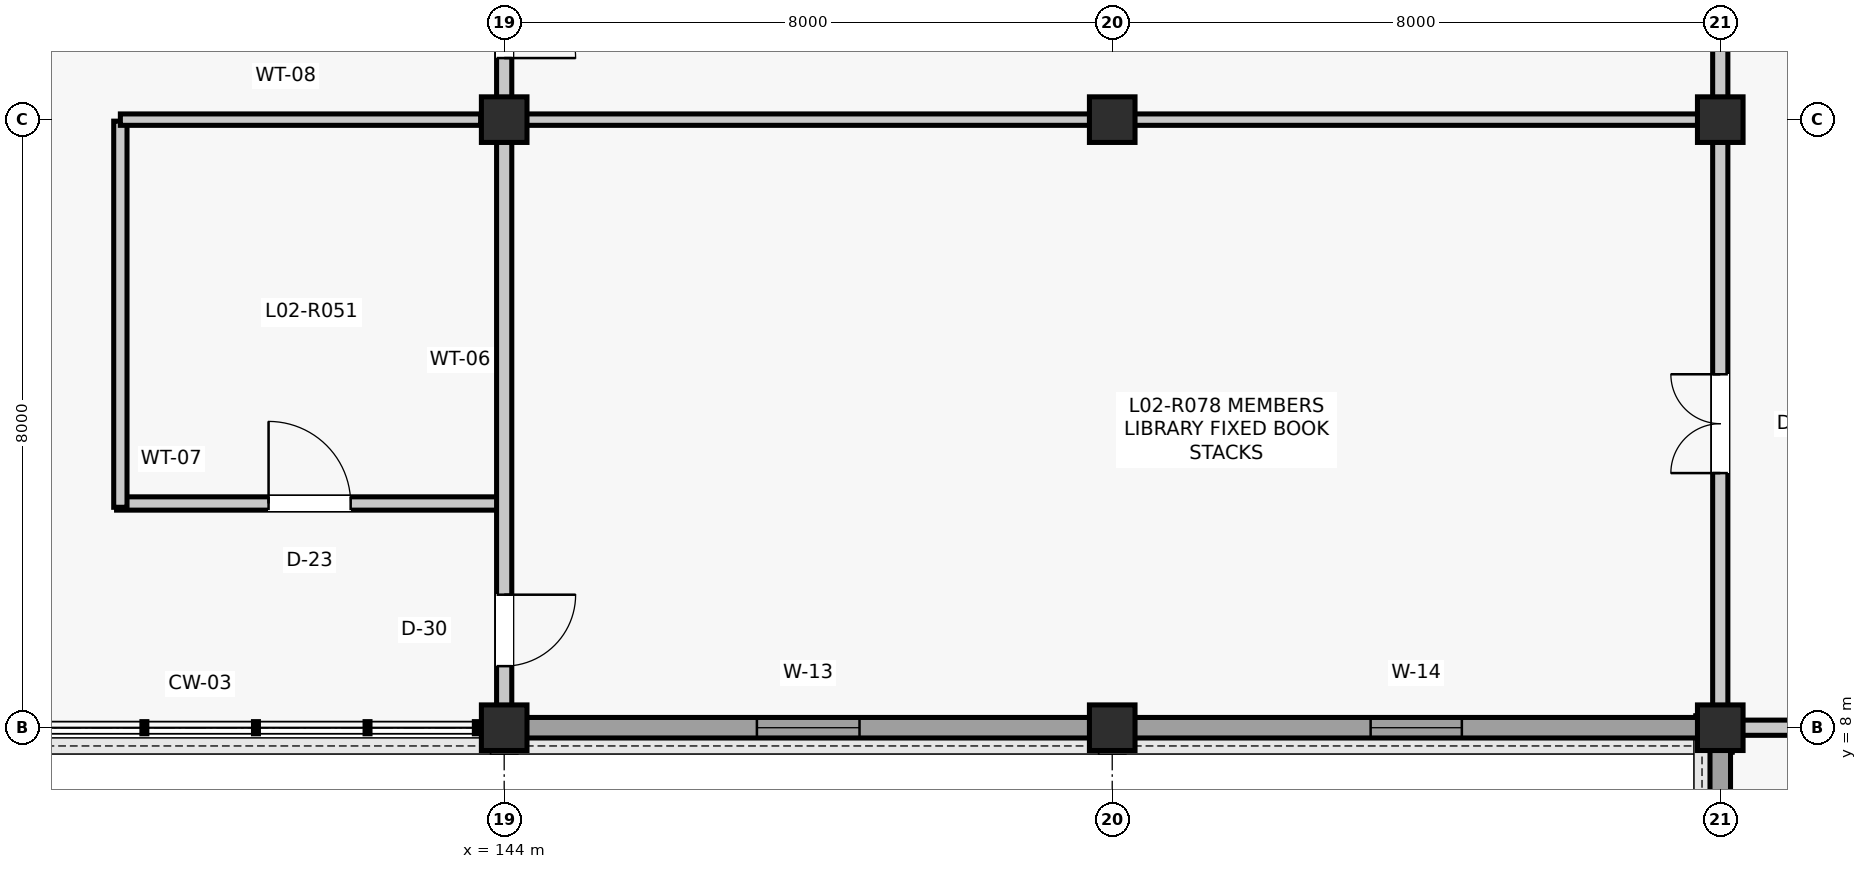
"""IFC4 building model, lengths in metres.
Left out: names, types, materials, properties, quantities, classifications, styles, units other than length and angle.
Written with IfcOpenShell. Run it as: python <this file> out.ifc"""

import sys

from ifc_helpers import new_model, si_unit, direction, frame, frame_2d, origin, origin_2d, place, context, subcontext, project, spatial, rectangle, extrude, element, fill, save


model = new_model("IFC4")
c1 = context("Model", 3, precision=1e-05, world=origin(), true_north=direction((0.0, 1.0)))
c2 = subcontext(c1, "Body", "Model", "MODEL_VIEW")
j1 = project(units=[si_unit("LENGTHUNIT", "METRE"), si_unit("PLANEANGLEUNIT", "RADIAN")], contexts=[c1])
p1 = place(None, origin())
s1 = spatial("IfcSite", under=j1, at=p1, CompositionType="ELEMENT")
p2 = place(p1, origin())
s2 = spatial("IfcBuilding", under=s1, at=p2, CompositionType="ELEMENT")
p3 = place(p2, frame((0.0, 0.0, 9.9)))
s3 = spatial("IfcBuildingStorey", under=s2, at=p3, CompositionType="ELEMENT", Elevation=9.9)
for number, where, z_axis, x_axis in (
    (1, (144.0, 8.0, 0.0), (0.0, 0.0, 1.0), (1.0, 0.0, 0.0)),
    (2, (144.0, 16.0, 0.0), (0.0, 0.0, 1.0), (1.0, 0.0, 0.0)),
    (3, (152.0, 8.0, 0.0), (0.0, 0.0, 1.0), (1.0, 0.0, 0.0)),
    (4, (152.0, 16.0, 0.0), (0.0, 0.0, 1.0), (1.0, 0.0, 0.0)),
    (5, (160.0, 8.0, 0.0), (0.0, 0.0, 1.0), (1.0, 0.0, 0.0)),
    (6, (160.0, 16.0, 0.0), (0.0, 0.0, 1.0), (1.0, 0.0, 0.0)),
):
    element("IfcColumn", number, at=place(p3, frame(where, z_axis=z_axis, x_axis=x_axis)), inside=s3, PredefinedType="COLUMN", context=c2, shape_type="SweptSolid", body=[
        extrude(rectangle(XDim=0.6, YDim=0.6, at=origin_2d()), origin(), (0.0, 0.0, 1.0), 3.96),
    ])
p4 = place(p3, frame((144.285, 8.0, 0.0), z_axis=(0.0, 0.0, 1.0), x_axis=(1.0, 0.0, 0.0)))
e7 = element("IfcWall", 7, at=p4, inside=s3, PredefinedType="SOLIDWALL", context=c2, shape_type="SweptSolid", body=[
    extrude(rectangle(XDim=7.43, YDim=0.27, at=frame_2d((3.715, 0.0))), origin(), (0.0, 0.0, 1.0), 3.344),
])
p5 = place(p4, frame((3.04, 0.0, 0.9)))
e8 = element("IfcOpeningElement", 8, at=p5, cuts=e7, PredefinedType="OPENING", context=c2, shape_type="SweptSolid", body=[
    extrude(rectangle(XDim=1.35, YDim=1.9, at=frame_2d((0.675, 0.95))), frame((0.0, 0.145, 0.0), z_axis=(0.0, -1.0, 0.0), x_axis=(1.0, 0.0, 0.0)), (0.0, 0.0, 1.0), 0.29),
])
p6 = place(p3, frame((152.285, 8.0, 0.0), z_axis=(0.0, 0.0, 1.0), x_axis=(1.0, 0.0, 0.0)))
e9 = element("IfcWall", 9, at=p6, inside=s3, PredefinedType="SOLIDWALL", context=c2, shape_type="SweptSolid", body=[
    extrude(rectangle(XDim=7.43, YDim=0.27, at=frame_2d((3.715, 0.0))), origin(), (0.0, 0.0, 1.0), 3.284),
])
p7 = place(p6, frame((3.115, 0.0, 0.9)))
e10 = element("IfcOpeningElement", 10, at=p7, cuts=e9, PredefinedType="OPENING", context=c2, shape_type="SweptSolid", body=[
    extrude(rectangle(XDim=1.2, YDim=1.8, at=frame_2d((0.6, 0.9))), frame((0.0, 0.145, 0.0), z_axis=(0.0, -1.0, 0.0), x_axis=(1.0, 0.0, 0.0)), (0.0, 0.0, 1.0), 0.29),
])
p8 = place(p3, frame((160.0, 0.285, 0.0), z_axis=(0.0, 0.0, 1.0), x_axis=(0.0, 1.0, 0.0)))
e11 = element("IfcWall", 11, at=p8, inside=s3, PredefinedType="SOLIDWALL", context=c2, shape_type="SweptSolid", body=[
    extrude(rectangle(XDim=7.43, YDim=0.27, at=frame_2d((3.715, 0.0))), origin(), (0.0, 0.0, 1.0), 3.284),
])
p9 = place(p8, frame((3.115, 0.0, 0.9)))
e12 = element("IfcOpeningElement", 12, at=p9, cuts=e11, PredefinedType="OPENING", context=c2, shape_type="SweptSolid", body=[
    extrude(rectangle(XDim=1.2, YDim=1.8, at=frame_2d((0.6, 0.9))), frame((0.0, 0.145, 0.0), z_axis=(0.0, -1.0, 0.0), x_axis=(1.0, 0.0, 0.0)), (0.0, 0.0, 1.0), 0.29),
])
p10 = place(p3, frame((138.9, 10.95, 0.0), z_axis=(0.0, 0.0, 1.0), x_axis=(1.0, 0.0, 0.0)))
e13 = element("IfcWall", 13, at=p10, inside=s3, PredefinedType="PARTITIONING", context=c2, shape_type="SweptSolid", body=[
    extrude(rectangle(XDim=5.08, YDim=0.175, at=frame_2d((2.54, 0.0))), origin(), (0.0, 0.0, 1.0), 3.221),
])
p11 = place(p10, frame((2.0, 0.0, 0.0)))
e14 = element("IfcOpeningElement", 14, at=p11, cuts=e13, PredefinedType="OPENING", context=c2, shape_type="SweptSolid", body=[
    extrude(rectangle(XDim=1.08, YDim=2.2, at=frame_2d((0.54, 1.1))), frame((0.0, 0.097, 0.0), z_axis=(0.0, -1.0, 0.0), x_axis=(1.0, 0.0, 0.0)), (0.0, 0.0, 1.0), 0.195),
])
p12 = place(p3, frame((138.95, 10.9, 0.0), z_axis=(0.0, 0.0, 1.0), x_axis=(0.0, 1.0, 0.0)))
e15 = element("IfcWall", 15, at=p12, inside=s3, PredefinedType="PARTITIONING", context=c2, shape_type="SweptSolid", body=[
    extrude(rectangle(XDim=5.08, YDim=0.175, at=frame_2d((2.54, 0.0))), origin(), (0.0, 0.0, 1.0), 3.151),
])
p13 = place(p3, frame((138.95, 16.0, 0.0), z_axis=(0.0, 0.0, 1.0), x_axis=(1.0, 0.0, 0.0)))
e16 = element("IfcWall", 16, at=p13, inside=s3, PredefinedType="PARTITIONING", context=c2, shape_type="SweptSolid", body=[
    extrude(rectangle(XDim=4.74, YDim=0.15, at=frame_2d((2.37, 0.0))), origin(), (0.0, 0.0, 1.0), 3.151),
])
p14 = place(p3, frame((144.0, 8.29, 0.0), z_axis=(0.0, 0.0, 1.0), x_axis=(0.0, 1.0, 0.0)))
e17 = element("IfcWall", 17, at=p14, inside=s3, PredefinedType="PARTITIONING", context=c2, shape_type="SweptSolid", body=[
    extrude(rectangle(XDim=7.42, YDim=0.2, at=frame_2d((3.71, 0.0))), origin(), (0.0, 0.0, 1.0), 3.221),
])
p15 = place(p14, frame((0.52, 0.0, 0.0)))
e18 = element("IfcOpeningElement", 18, at=p15, cuts=e17, PredefinedType="OPENING", context=c2, shape_type="SweptSolid", body=[
    extrude(rectangle(XDim=0.94, YDim=2.12, at=frame_2d((0.47, 1.06))), frame((0.0, 0.11, 0.0), z_axis=(0.0, -1.0, 0.0), x_axis=(1.0, 0.0, 0.0)), (0.0, 0.0, 1.0), 0.22),
])
p16 = place(p3, frame((144.0, 16.29, 0.0), z_axis=(0.0, 0.0, 1.0), x_axis=(0.0, 1.0, 0.0)))
e19 = element("IfcWall", 19, at=p16, inside=s3, PredefinedType="PARTITIONING", context=c2, shape_type="SweptSolid", body=[
    extrude(rectangle(XDim=7.42, YDim=0.2, at=frame_2d((3.71, 0.0))), origin(), (0.0, 0.0, 1.0), 3.157),
])
p17 = place(p16, frame((0.52, 0.0, 0.0)))
e20 = element("IfcOpeningElement", 20, at=p17, cuts=e19, PredefinedType="OPENING", context=c2, shape_type="SweptSolid", body=[
    extrude(rectangle(XDim=0.94, YDim=2.12, at=frame_2d((0.47, 1.06))), frame((0.0, 0.11, 0.0), z_axis=(0.0, -1.0, 0.0), x_axis=(1.0, 0.0, 0.0)), (0.0, 0.0, 1.0), 0.22),
])
p18 = place(p3, frame((144.29, 16.0, 0.0), z_axis=(0.0, 0.0, 1.0), x_axis=(1.0, 0.0, 0.0)))
e21 = element("IfcWall", 21, at=p18, inside=s3, PredefinedType="PARTITIONING", context=c2, shape_type="SweptSolid", body=[
    extrude(rectangle(XDim=7.42, YDim=0.15, at=frame_2d((3.71, 0.0))), origin(), (0.0, 0.0, 1.0), 3.082),
])
p19 = place(p3, frame((160.0, 8.29, 0.0), z_axis=(0.0, 0.0, 1.0), x_axis=(0.0, 1.0, 0.0)))
e22 = element("IfcWall", 22, at=p19, inside=s3, PredefinedType="PARTITIONING", context=c2, shape_type="SweptSolid", body=[
    extrude(rectangle(XDim=7.42, YDim=0.2, at=frame_2d((3.71, 0.0))), origin(), (0.0, 0.0, 1.0), 3.227),
])
p20 = place(p19, frame((3.06, 0.0, 0.0)))
e23 = element("IfcOpeningElement", 23, at=p20, cuts=e22, PredefinedType="OPENING", context=c2, shape_type="SweptSolid", body=[
    extrude(rectangle(XDim=1.3, YDim=2.2, at=frame_2d((0.65, 1.1))), frame((0.0, 0.11, 0.0), z_axis=(0.0, -1.0, 0.0), x_axis=(1.0, 0.0, 0.0)), (0.0, 0.0, 1.0), 0.22),
])
p21 = place(p3, frame((152.29, 16.0, 0.0), z_axis=(0.0, 0.0, 1.0), x_axis=(1.0, 0.0, 0.0)))
e24 = element("IfcWall", 24, at=p21, inside=s3, PredefinedType="PARTITIONING", context=c2, shape_type="SweptSolid", body=[
    extrude(rectangle(XDim=7.42, YDim=0.15, at=frame_2d((3.71, 0.0))), origin(), (0.0, 0.0, 1.0), 3.157),
])
p22 = place(p3, frame((160.0, 16.29, 0.0), z_axis=(0.0, 0.0, 1.0), x_axis=(0.0, 1.0, 0.0)))
e25 = element("IfcWall", 25, at=p22, inside=s3, PredefinedType="PARTITIONING", context=c2, shape_type="SweptSolid", body=[
    extrude(rectangle(XDim=7.42, YDim=0.2, at=frame_2d((3.71, 0.0))), origin(), (0.0, 0.0, 1.0), 3.151),
])
p23 = place(p22, frame((3.01, 0.0, 0.0)))
e26 = element("IfcOpeningElement", 26, at=p23, cuts=e25, PredefinedType="OPENING", context=c2, shape_type="SweptSolid", body=[
    extrude(rectangle(XDim=1.4, YDim=2.2, at=frame_2d((0.7, 1.1))), frame((0.0, 0.11, 0.0), z_axis=(0.0, -1.0, 0.0), x_axis=(1.0, 0.0, 0.0)), (0.0, 0.0, 1.0), 0.22),
])
p24 = place(p3, frame((160.29, 8.0, 0.0), z_axis=(0.0, 0.0, 1.0), x_axis=(1.0, 0.0, 0.0)))
e27 = element("IfcWall", 27, at=p24, inside=s3, PredefinedType="PARTITIONING", context=c2, shape_type="SweptSolid", body=[
    extrude(rectangle(XDim=7.42, YDim=0.2, at=frame_2d((3.71, 0.0))), origin(), (0.0, 0.0, 1.0), 3.157),
])
p25 = place(p24, frame((3.25, 0.0, 0.0)))
e28 = element("IfcOpeningElement", 28, at=p25, cuts=e27, PredefinedType="OPENING", context=c2, shape_type="SweptSolid", body=[
    extrude(rectangle(XDim=0.92, YDim=2.1, at=frame_2d((0.46, 1.05))), frame((0.0, 0.11, 0.0), z_axis=(0.0, -1.0, 0.0), x_axis=(1.0, 0.0, 0.0)), (0.0, 0.0, 1.0), 0.22),
])
p26 = place(p5, origin())
e29 = element("IfcWindow", 29, at=p26, inside=s3, PartitioningType="SINGLE_PANEL", PredefinedType="WINDOW", context=c2, shape_type="SweptSolid", body=[
    extrude(rectangle(XDim=1.35, YDim=1.9, at=frame_2d((0.675, 0.95))), frame((0.0, 0.03, 0.0), z_axis=(0.0, -1.0, 0.0), x_axis=(1.0, 0.0, 0.0)), (0.0, 0.0, 1.0), 0.06),
])
fill(e8, e29)
p27 = place(p7, origin())
e30 = element("IfcWindow", 30, at=p27, inside=s3, PartitioningType="SINGLE_PANEL", PredefinedType="WINDOW", context=c2, shape_type="SweptSolid", body=[
    extrude(rectangle(XDim=1.2, YDim=1.8, at=frame_2d((0.6, 0.9))), frame((0.0, 0.03, 0.0), z_axis=(0.0, -1.0, 0.0), x_axis=(1.0, 0.0, 0.0)), (0.0, 0.0, 1.0), 0.06),
])
fill(e10, e30)
p28 = place(p11, origin())
e31 = element("IfcDoor", 31, at=p28, inside=s3, OperationType="SINGLE_SWING_LEFT", PredefinedType="DOOR", context=c2, shape_type="SweptSolid", body=[
    extrude(rectangle(XDim=1.08, YDim=2.2, at=frame_2d((0.54, 1.1))), frame((0.0, 0.025, 0.0), z_axis=(0.0, -1.0, 0.0), x_axis=(1.0, 0.0, 0.0)), (0.0, 0.0, 1.0), 0.05),
])
fill(e14, e31)
p29 = place(p15, frame((0.94, 0.0, 0.0), z_axis=(0.0, 0.0, 1.0), x_axis=(-1.0, 0.0, 0.0)))
e32 = element("IfcDoor", 32, at=p29, inside=s3, OperationType="SINGLE_SWING_RIGHT", PredefinedType="DOOR", context=c2, shape_type="SweptSolid", body=[
    extrude(rectangle(XDim=0.94, YDim=2.12, at=frame_2d((0.47, 1.06))), frame((0.0, 0.025, 0.0), z_axis=(0.0, -1.0, 0.0), x_axis=(1.0, 0.0, 0.0)), (0.0, 0.0, 1.0), 0.05),
])
fill(e18, e32)
p30 = place(p17, frame((0.94, 0.0, 0.0), z_axis=(0.0, 0.0, 1.0), x_axis=(-1.0, 0.0, 0.0)))
e33 = element("IfcDoor", 33, at=p30, inside=s3, OperationType="SINGLE_SWING_LEFT", PredefinedType="DOOR", context=c2, shape_type="SweptSolid", body=[
    extrude(rectangle(XDim=0.94, YDim=2.12, at=frame_2d((0.47, 1.06))), frame((0.0, 0.025, 0.0), z_axis=(0.0, -1.0, 0.0), x_axis=(1.0, 0.0, 0.0)), (0.0, 0.0, 1.0), 0.05),
])
fill(e20, e33)
p31 = place(p20, origin())
e34 = element("IfcDoor", 34, at=p31, inside=s3, OperationType="DOUBLE_DOOR_SINGLE_SWING", PredefinedType="DOOR", context=c2, shape_type="SweptSolid", body=[
    extrude(rectangle(XDim=1.3, YDim=2.2, at=frame_2d((0.65, 1.1))), frame((0.0, 0.025, 0.0), z_axis=(0.0, -1.0, 0.0), x_axis=(1.0, 0.0, 0.0)), (0.0, 0.0, 1.0), 0.05),
])
fill(e23, e34)
save(model, sys.argv[1])
